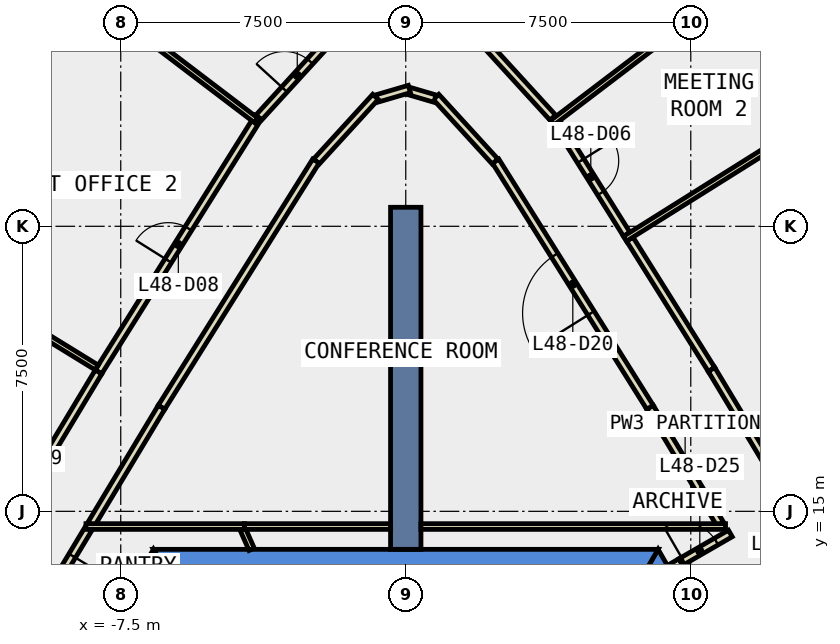
"""IFC4 building model, lengths in metres.
Left out: names, types, materials, properties, quantities, classifications, styles, units other than length and angle.
Written with IfcOpenShell. Run it as: python <this file> out.ifc"""

import sys

from ifc_helpers import new_model, si_unit, direction, frame, frame_2d, origin, place, context, subcontext, project, spatial, polyline, rectangle, outline, extrude, element, fill, save


model = new_model("IFC4")
c1 = context("Model", 3, precision=1e-05, world=origin(), true_north=direction((0.0, 1.0)))
c2 = subcontext(c1, "Body", "Model", "MODEL_VIEW")
j1 = project(units=[si_unit("LENGTHUNIT", "METRE"), si_unit("PLANEANGLEUNIT", "RADIAN")], contexts=[c1])
p1 = place(None, origin())
s1 = spatial("IfcSite", under=j1, at=p1, CompositionType="ELEMENT")
p2 = place(p1, origin())
s2 = spatial("IfcBuilding", under=s1, at=p2, CompositionType="ELEMENT")
p3 = place(p2, frame((0.0, 0.0, 215.0)))
s3 = spatial("IfcBuildingStorey", under=s2, at=p3, CompositionType="ELEMENT", Elevation=215.0)
p4 = place(p3, frame((0.0, 0.0, -0.4)))
e1 = element("IfcWall", 1, at=p4, inside=s3, PredefinedType="SHEAR", context=c2, shape_type="SweptSolid", body=[
    extrude(outline(polyline([(6.478, 12.88), (7.084, 13.23), (6.64, 14.0), (6.235, 13.3), (6.478, 12.88)])), origin(), (0.0, 0.0, 1.0), 4.2),
])
p5 = place(p3, frame((0.0, 0.0, -0.4)))
e2 = element("IfcWall", 2, at=p5, inside=s3, PredefinedType="SHEAR", context=c2, shape_type="SweptSolid", body=[
    extrude(outline(polyline([(6.64, 14.0), (-6.64, 14.0), (-6.235, 13.3), (6.235, 13.3), (6.64, 14.0)])), origin(), (0.0, 0.0, 1.0), 4.2),
])
p6 = place(p3, frame((0.0, 0.0, -0.4)))
e3 = element("IfcWall", 3, at=p6, inside=s3, PredefinedType="SHEAR", context=c2, shape_type="SweptSolid", body=[
    extrude(outline(polyline([(-11.834, 5.002), (-11.228, 4.652), (-6.235, 13.3), (-6.64, 14.0), (-11.834, 5.002)])), origin(), (0.0, 0.0, 1.0), 4.2),
])
p7 = place(p3, frame((0.0, 14.0, -0.4), z_axis=(0.0, 0.0, 1.0), x_axis=(0.0, 1.0, 0.0)))
e4 = element("IfcWall", 4, at=p7, inside=s3, PredefinedType="SHEAR", context=c2, shape_type="SweptSolid", body=[
    extrude(rectangle(XDim=9.0, YDim=0.8, at=frame_2d((4.5, 0.0))), origin(), (0.0, 0.0, 1.0), 4.2),
])
p8 = place(p3, frame((13.021, 22.374, 0.0), z_axis=(0.0, 0.0, 1.0), x_axis=(-0.531239262679, 0.847221839773, 0.0)))
e5 = element("IfcWall", 5, at=p8, inside=s3, PredefinedType="STANDARD", context=c2, shape_type="SweptSolid", body=[
    extrude(rectangle(XDim=7.339, YDim=0.3, at=frame_2d((3.67, 0.0))), origin(), (0.0, 0.0, 1.0), 3.8),
])
p9 = place(p8, frame((0.635, 0.0, 0.9)))
e6 = element("IfcOpeningElement", 6, at=p9, cuts=e5, PredefinedType="OPENING", context=c2, shape_type="SweptSolid", body=[
    extrude(rectangle(XDim=2.4, YDim=2.6, at=frame_2d((1.2, 1.3))), frame((0.0, 0.16, 0.0), z_axis=(0.0, -1.0, 0.0), x_axis=(1.0, 0.0, 0.0)), (0.0, 0.0, 1.0), 0.32),
])
p10 = place(p8, frame((4.304, 0.0, 0.9)))
e7 = element("IfcOpeningElement", 7, at=p10, cuts=e5, PredefinedType="OPENING", context=c2, shape_type="SweptSolid", body=[
    extrude(rectangle(XDim=2.4, YDim=2.6, at=frame_2d((1.2, 1.3))), frame((0.0, 0.16, 0.0), z_axis=(0.0, -1.0, 0.0), x_axis=(1.0, 0.0, 0.0)), (0.0, 0.0, 1.0), 0.32),
])
p11 = place(p3, frame((-9.122, 28.592, 0.0), z_axis=(0.0, 0.0, 1.0), x_axis=(-0.531239262679, -0.847221839773, 0.0)))
e8 = element("IfcWall", 8, at=p11, inside=s3, PredefinedType="STANDARD", context=c2, shape_type="SweptSolid", body=[
    extrude(rectangle(XDim=7.339, YDim=0.3, at=frame_2d((3.67, 0.0))), origin(), (0.0, 0.0, 1.0), 3.8),
])
p12 = place(p11, frame((0.635, 0.0, 0.9)))
e9 = element("IfcOpeningElement", 9, at=p12, cuts=e8, PredefinedType="OPENING", context=c2, shape_type="SweptSolid", body=[
    extrude(rectangle(XDim=2.4, YDim=2.6, at=frame_2d((1.2, 1.3))), frame((0.0, 0.16, 0.0), z_axis=(0.0, -1.0, 0.0), x_axis=(1.0, 0.0, 0.0)), (0.0, 0.0, 1.0), 0.32),
])
p13 = place(p11, frame((4.304, 0.0, 0.9)))
e10 = element("IfcOpeningElement", 10, at=p13, cuts=e8, PredefinedType="OPENING", context=c2, shape_type="SweptSolid", body=[
    extrude(rectangle(XDim=2.4, YDim=2.6, at=frame_2d((1.2, 1.3))), frame((0.0, 0.16, 0.0), z_axis=(0.0, -1.0, 0.0), x_axis=(1.0, 0.0, 0.0)), (0.0, 0.0, 1.0), 0.32),
])
p14 = place(p3, frame((6.934, 13.49, 0.0), z_axis=(0.0, 0.0, 1.0), x_axis=(0.865871789474, 0.500265973451, 0.0)))
e11 = element("IfcWall", 11, at=p14, inside=s3, PredefinedType="PARTITIONING", context=c2, shape_type="SweptSolid", body=[
    extrude(rectangle(XDim=0.35, YDim=0.2, at=frame_2d((0.175, 0.0))), origin(), (0.0, 0.0, 1.0), 2.4),
])
p15 = place(p3, frame((-8.353, 14.536, 0.0), z_axis=(0.0, 0.0, 1.0), x_axis=(-0.515636196259, -0.856807628997, 0.0)))
e12 = element("IfcWall", 12, at=p15, inside=s3, PredefinedType="PARTITIONING", context=c2, shape_type="SweptSolid", body=[
    extrude(rectangle(XDim=2.643, YDim=0.2, at=frame_2d((1.322, 0.0))), origin(), (0.0, 0.0, 1.0), 3.8),
])
p16 = place(p15, frame((0.822, 0.0, 0.0)))
e13 = element("IfcOpeningElement", 13, at=p16, cuts=e12, PredefinedType="OPENING", context=c2, shape_type="SweptSolid", body=[
    extrude(rectangle(XDim=1.0, YDim=2.1, at=frame_2d((0.5, 1.05))), frame((0.0, 0.11, 0.0), z_axis=(0.0, -1.0, 0.0), x_axis=(1.0, 0.0, 0.0)), (0.0, 0.0, 1.0), 0.22),
])
p17 = place(p3, frame((8.276, 14.664, 0.0), z_axis=(0.0, 0.0, 1.0), x_axis=(-0.515416266777, 0.85693994652, 0.0)))
e14 = element("IfcWall", 14, at=p17, inside=s3, PredefinedType="PARTITIONING", context=c2, shape_type="SweptSolid", body=[
    extrude(rectangle(XDim=3.587, YDim=0.2, at=frame_2d((1.793, 0.0))), origin(), (0.0, 0.0, 1.0), 3.8),
])
p18 = place(p3, frame((6.427, 17.738, 0.0), z_axis=(0.0, 0.0, 1.0), x_axis=(-0.531335643981, 0.847161397512, 0.0)))
e15 = element("IfcWall", 15, at=p18, inside=s3, PredefinedType="PARTITIONING", context=c2, shape_type="SweptSolid", body=[
    extrude(rectangle(XDim=7.647, YDim=0.2, at=frame_2d((3.823, 0.0))), origin(), (0.0, 0.0, 1.0), 3.8),
])
p19 = place(p18, frame((2.923, 0.0, 0.0)))
e16 = element("IfcOpeningElement", 16, at=p19, cuts=e15, PredefinedType="OPENING", context=c2, shape_type="SweptSolid", body=[
    extrude(rectangle(XDim=1.8, YDim=2.1, at=frame_2d((0.9, 1.05))), frame((0.0, 0.11, 0.0), z_axis=(0.0, -1.0, 0.0), x_axis=(1.0, 0.0, 0.0)), (0.0, 0.0, 1.0), 0.22),
])
p20 = place(p3, frame((2.35, 24.205, 0.0), z_axis=(0.0, 0.0, 1.0), x_axis=(-0.67475930229, 0.738037860799, 0.0)))
e17 = element("IfcWall", 17, at=p20, inside=s3, PredefinedType="PARTITIONING", context=c2, shape_type="SweptSolid", body=[
    extrude(rectangle(XDim=2.303, YDim=0.2, at=frame_2d((1.152, 0.0))), origin(), (0.0, 0.0, 1.0), 3.8),
])
p21 = place(p3, frame((0.768, 25.86, 0.0), z_axis=(0.0, 0.0, 1.0), x_axis=(-0.959714481723, 0.280977069476, 0.0)))
e18 = element("IfcWall", 18, at=p21, inside=s3, PredefinedType="PARTITIONING", context=c2, shape_type="SweptSolid", body=[
    extrude(rectangle(XDim=0.7, YDim=0.2, at=frame_2d((0.35, 0.0))), origin(), (0.0, 0.0, 1.0), 3.8),
])
p22 = place(p3, frame((0.096, 26.113, 0.0), z_axis=(0.0, 0.0, 1.0), x_axis=(-0.959723140705, -0.280947491882, 0.0)))
e19 = element("IfcWall", 19, at=p22, inside=s3, PredefinedType="PARTITIONING", context=c2, shape_type="SweptSolid", body=[
    extrude(rectangle(XDim=0.9, YDim=0.2, at=frame_2d((0.45, 0.0))), origin(), (0.0, 0.0, 1.0), 3.8),
])
p23 = place(p3, frame((-0.796, 25.905, 0.0), z_axis=(0.0, 0.0, 1.0), x_axis=(-0.67475930229, -0.738037860799, 0.0)))
e20 = element("IfcWall", 20, at=p23, inside=s3, PredefinedType="PARTITIONING", context=c2, shape_type="SweptSolid", body=[
    extrude(rectangle(XDim=2.303, YDim=0.2, at=frame_2d((1.152, 0.0))), origin(), (0.0, 0.0, 1.0), 3.8),
])
p24 = place(p3, frame((-2.364, 24.216, 0.0), z_axis=(0.0, 0.0, 1.0), x_axis=(-0.531335643981, -0.847161397512, 0.0)))
e21 = element("IfcWall", 21, at=p24, inside=s3, PredefinedType="PARTITIONING", context=c2, shape_type="SweptSolid", body=[
    extrude(rectangle(XDim=7.647, YDim=0.2, at=frame_2d((3.823, 0.0))), origin(), (0.0, 0.0, 1.0), 3.8),
])
p25 = place(p3, frame((-6.427, 17.738, 0.0), z_axis=(0.0, 0.0, 1.0), x_axis=(-0.515416266777, -0.85693994652, 0.0)))
e22 = element("IfcWall", 22, at=p25, inside=s3, PredefinedType="PARTITIONING", context=c2, shape_type="SweptSolid", body=[
    extrude(rectangle(XDim=3.587, YDim=0.2, at=frame_2d((1.793, 0.0))), origin(), (0.0, 0.0, 1.0), 3.8),
])
p26 = place(p3, frame((5.895, 22.162, 0.0), z_axis=(0.0, 0.0, 1.0), x_axis=(0.531245023709, -0.847218227368, 0.0)))
e23 = element("IfcWall", 23, at=p26, inside=s3, PredefinedType="PARTITIONING", context=c2, shape_type="SweptSolid", body=[
    extrude(rectangle(XDim=4.049, YDim=0.2, at=frame_2d((2.024, 0.0))), origin(), (0.0, 0.0, 1.0), 3.8),
])
p27 = place(p3, frame((8.046, 18.732, 0.0), z_axis=(0.0, 0.0, 1.0), x_axis=(0.515502328211, -0.856888178007, 0.0)))
e24 = element("IfcWall", 24, at=p27, inside=s3, PredefinedType="PARTITIONING", context=c2, shape_type="SweptSolid", body=[
    extrude(rectangle(XDim=8.058, YDim=0.2, at=frame_2d((4.029, 0.0))), origin(), (0.0, 0.0, 1.0), 3.8),
])
p28 = place(p27, frame((3.604, 0.0, 0.0)))
e25 = element("IfcOpeningElement", 25, at=p28, cuts=e24, PredefinedType="OPENING", context=c2, shape_type="SweptSolid", body=[
    extrude(rectangle(XDim=1.0, YDim=2.1, at=frame_2d((0.5, 1.05))), frame((0.0, 0.11, 0.0), z_axis=(0.0, -1.0, 0.0), x_axis=(1.0, 0.0, 0.0)), (0.0, 0.0, 1.0), 0.22),
])
p29 = place(p3, frame((3.923, 25.307, 0.0), z_axis=(0.0, 0.0, 1.0), x_axis=(0.531150612982, -0.847277419934, 0.0)))
e26 = element("IfcWall", 26, at=p29, inside=s3, PredefinedType="PARTITIONING", context=c2, shape_type="SweptSolid", body=[
    extrude(rectangle(XDim=3.562, YDim=0.2, at=frame_2d((1.781, 0.0))), origin(), (0.0, 0.0, 1.0), 3.8),
])
p30 = place(p29, frame((1.281, 0.0, 0.0)))
e27 = element("IfcOpeningElement", 27, at=p30, cuts=e26, PredefinedType="OPENING", context=c2, shape_type="SweptSolid", body=[
    extrude(rectangle(XDim=1.0, YDim=2.1, at=frame_2d((0.5, 1.05))), frame((0.0, 0.11, 0.0), z_axis=(0.0, -1.0, 0.0), x_axis=(1.0, 0.0, 0.0)), (0.0, 0.0, 1.0), 0.22),
])
p31 = place(p3, frame((-3.869, 25.36, 0.0), z_axis=(0.0, 0.0, 1.0), x_axis=(0.674594755709, 0.738188265668, 0.0)))
e28 = element("IfcWall", 28, at=p31, inside=s3, PredefinedType="PARTITIONING", context=c2, shape_type="SweptSolid", body=[
    extrude(rectangle(XDim=3.006, YDim=0.2, at=frame_2d((1.503, 0.0))), origin(), (0.0, 0.0, 1.0), 3.8),
])
p32 = place(p31, frame((1.003, 0.0, 0.0)))
e29 = element("IfcOpeningElement", 29, at=p32, cuts=e28, PredefinedType="OPENING", context=c2, shape_type="SweptSolid", body=[
    extrude(rectangle(XDim=1.0, YDim=2.1, at=frame_2d((0.5, 1.05))), frame((0.0, 0.11, 0.0), z_axis=(0.0, -1.0, 0.0), x_axis=(1.0, 0.0, 0.0)), (0.0, 0.0, 1.0), 0.22),
])
p33 = place(p3, frame((1.841, 27.579, 0.0), z_axis=(0.0, 0.0, 1.0), x_axis=(0.674594755709, -0.738188265668, 0.0)))
e30 = element("IfcWall", 30, at=p33, inside=s3, PredefinedType="PARTITIONING", context=c2, shape_type="SweptSolid", body=[
    extrude(rectangle(XDim=3.006, YDim=0.2, at=frame_2d((1.503, 0.0))), origin(), (0.0, 0.0, 1.0), 3.8),
])
p34 = place(p3, frame((-8.086, 18.669, 0.0), z_axis=(0.0, 0.0, 1.0), x_axis=(0.531329962263, 0.847164961033, 0.0)))
e31 = element("IfcWall", 31, at=p34, inside=s3, PredefinedType="PARTITIONING", context=c2, shape_type="SweptSolid", body=[
    extrude(rectangle(XDim=7.91, YDim=0.2, at=frame_2d((3.955, 0.0))), origin(), (0.0, 0.0, 1.0), 3.8),
])
p35 = place(p34, frame((3.455, 0.0, 0.0)))
e32 = element("IfcOpeningElement", 32, at=p35, cuts=e31, PredefinedType="OPENING", context=c2, shape_type="SweptSolid", body=[
    extrude(rectangle(XDim=1.0, YDim=2.1, at=frame_2d((0.5, 1.05))), frame((0.0, 0.11, 0.0), z_axis=(0.0, -1.0, 0.0), x_axis=(1.0, 0.0, 0.0)), (0.0, 0.0, 1.0), 0.22),
])
p36 = place(p3, frame((-12.239, 11.763, 0.0), z_axis=(0.0, 0.0, 1.0), x_axis=(0.515591302858, 0.856834644734, 0.0)))
e33 = element("IfcWall", 33, at=p36, inside=s3, PredefinedType="PARTITIONING", context=c2, shape_type="SweptSolid", body=[
    extrude(rectangle(XDim=8.059, YDim=0.2, at=frame_2d((4.029, 0.0))), origin(), (0.0, 0.0, 1.0), 3.8),
])
p37 = place(p36, frame((3.604, 0.0, 0.0)))
e34 = element("IfcOpeningElement", 34, at=p37, cuts=e33, PredefinedType="OPENING", context=c2, shape_type="SweptSolid", body=[
    extrude(rectangle(XDim=1.0, YDim=2.1, at=frame_2d((0.5, 1.05))), frame((0.0, 0.11, 0.0), z_axis=(0.0, -1.0, 0.0), x_axis=(1.0, 0.0, 0.0)), (0.0, 0.0, 1.0), 0.22),
])
p38 = place(p3, frame((-4.055, 14.0, 0.0), z_axis=(0.0, 0.0, 1.0), x_axis=(-0.404850841056, 0.914382740703, 0.0)))
e35 = element("IfcWall", 35, at=p38, inside=s3, PredefinedType="PARTITIONING", context=c2, shape_type="SweptSolid", body=[
    extrude(rectangle(XDim=0.581, YDim=0.15, at=frame_2d((0.291, 0.0))), origin(), (0.0, 0.0, 1.0), 3.8),
])
p39 = place(p3, frame((8.415, 14.6, 0.0), z_axis=(0.0, 0.0, 1.0), x_axis=(-1.0, 0.0, 0.0)))
e36 = element("IfcWall", 36, at=p39, inside=s3, PredefinedType="PARTITIONING", context=c2, shape_type="SweptSolid", body=[
    extrude(rectangle(XDim=8.015, YDim=0.15, at=frame_2d((4.008, 0.0))), origin(), (0.0, 0.0, 1.0), 3.8),
])
p40 = place(p3, frame((-4.245, 14.6, 0.0), z_axis=(0.0, 0.0, 1.0), x_axis=(-1.0, 0.0, 0.0)))
e37 = element("IfcWall", 37, at=p40, inside=s3, PredefinedType="PARTITIONING", context=c2, shape_type="SweptSolid", body=[
    extrude(rectangle(XDim=4.17, YDim=0.15, at=frame_2d((2.085, 0.0))), origin(), (0.0, 0.0, 1.0), 3.8),
])
p41 = place(p3, frame((5.77, 22.172, 0.0), z_axis=(0.0, 0.0, 1.0), x_axis=(0.847187879248, 0.531293419171, 0.0)))
e38 = element("IfcWall", 38, at=p41, inside=s3, PredefinedType="PARTITIONING", context=c2, shape_type="SweptSolid", body=[
    extrude(rectangle(XDim=6.1, YDim=0.15, at=frame_2d((3.05, 0.0))), origin(), (0.0, 0.0, 1.0), 3.8),
])
p42 = place(p3, frame((3.856, 25.225, 0.0), z_axis=(0.0, 0.0, 1.0), x_axis=(0.795987848728, 0.605312600792, 0.0)))
e39 = element("IfcWall", 39, at=p42, inside=s3, PredefinedType="PARTITIONING", context=c2, shape_type="SweptSolid", body=[
    extrude(rectangle(XDim=4.804, YDim=0.15, at=frame_2d((2.402, 0.0))), origin(), (0.0, 0.0, 1.0), 3.8),
])
p43 = place(p3, frame((-3.936, 25.286, 0.0), z_axis=(0.0, 0.0, 1.0), x_axis=(-0.795977117067, 0.605326712698, 0.0)))
e40 = element("IfcWall", 40, at=p43, inside=s3, PredefinedType="PARTITIONING", context=c2, shape_type="SweptSolid", body=[
    extrude(rectangle(XDim=4.704, YDim=0.15, at=frame_2d((2.352, 0.0))), origin(), (0.0, 0.0, 1.0), 3.8),
])
p44 = place(p3, frame((-8.131, 18.784, 0.0), z_axis=(0.0, 0.0, 1.0), x_axis=(-0.851969320918, 0.52359170755, 0.0)))
e41 = element("IfcWall", 41, at=p44, inside=s3, PredefinedType="PARTITIONING", context=c2, shape_type="SweptSolid", body=[
    extrude(rectangle(XDim=4.58, YDim=0.15, at=frame_2d((2.29, 0.0))), origin(), (0.0, 0.0, 1.0), 3.8),
])
p45 = place(p3, frame((-0.4, 14.6, 0.0), z_axis=(0.0, 0.0, 1.0), x_axis=(-1.0, 0.0, 0.0)))
e42 = element("IfcWall", 42, at=p45, inside=s3, PredefinedType="PARTITIONING", context=c2, shape_type="SweptSolid", body=[
    extrude(rectangle(XDim=3.845, YDim=0.15, at=frame_2d((1.923, 0.0))), origin(), (0.0, 0.0, 1.0), 3.8),
])
p46 = place(p3, frame((7.237, 13.665, 0.0), z_axis=(0.0, 0.0, 1.0), x_axis=(0.865999269783, 0.500045262687, 0.0)))
e43 = element("IfcWall", 43, at=p46, inside=s3, PredefinedType="PARTITIONING", context=c2, shape_type="SweptSolid", body=[
    extrude(rectangle(XDim=1.506, YDim=0.2, at=frame_2d((0.753, 0.0))), origin(), (0.0, 0.0, 1.0), 3.8),
])
p47 = place(p46, frame((0.078, 0.0, 0.0)))
e44 = element("IfcOpeningElement", 44, at=p47, cuts=e43, PredefinedType="OPENING", context=c2, shape_type="SweptSolid", body=[
    extrude(rectangle(XDim=1.0, YDim=2.1, at=frame_2d((0.5, 1.05))), frame((0.0, 0.11, 0.0), z_axis=(0.0, -1.0, 0.0), x_axis=(1.0, 0.0, 0.0)), (0.0, 0.0, 1.0), 0.22),
])
p48 = place(p30, origin())
e45 = element("IfcDoor", 45, at=p48, inside=s3, OperationType="SINGLE_SWING_LEFT", PredefinedType="DOOR", context=c2, shape_type="SweptSolid", body=[
    extrude(rectangle(XDim=1.0, YDim=2.1, at=frame_2d((0.5, 1.05))), frame((0.0, 0.025, 0.0), z_axis=(0.0, -1.0, 0.0), x_axis=(1.0, 0.0, 0.0)), (0.0, 0.0, 1.0), 0.05),
])
fill(e27, e45)
p49 = place(p32, origin())
e46 = element("IfcDoor", 46, at=p49, inside=s3, OperationType="SINGLE_SWING_LEFT", PredefinedType="DOOR", context=c2, shape_type="SweptSolid", body=[
    extrude(rectangle(XDim=1.0, YDim=2.1, at=frame_2d((0.5, 1.05))), frame((0.0, 0.025, 0.0), z_axis=(0.0, -1.0, 0.0), x_axis=(1.0, 0.0, 0.0)), (0.0, 0.0, 1.0), 0.05),
])
fill(e29, e46)
p50 = place(p35, origin())
e47 = element("IfcDoor", 47, at=p50, inside=s3, OperationType="SINGLE_SWING_RIGHT", PredefinedType="DOOR", context=c2, shape_type="SweptSolid", body=[
    extrude(rectangle(XDim=1.0, YDim=2.1, at=frame_2d((0.5, 1.05))), frame((0.0, 0.025, 0.0), z_axis=(0.0, -1.0, 0.0), x_axis=(1.0, 0.0, 0.0)), (0.0, 0.0, 1.0), 0.05),
])
fill(e32, e47)
p51 = place(p19, origin())
e48 = element("IfcDoor", 48, at=p51, inside=s3, OperationType="DOUBLE_DOOR_SINGLE_SWING", PredefinedType="DOOR", context=c2, shape_type="SweptSolid", body=[
    extrude(rectangle(XDim=1.8, YDim=2.1, at=frame_2d((0.9, 1.05))), frame((0.0, 0.025, 0.0), z_axis=(0.0, -1.0, 0.0), x_axis=(1.0, 0.0, 0.0)), (0.0, 0.0, 1.0), 0.05),
])
fill(e16, e48)
p52 = place(p47, origin())
e49 = element("IfcDoor", 49, at=p52, inside=s3, OperationType="SINGLE_SWING_LEFT", PredefinedType="DOOR", context=c2, shape_type="SweptSolid", body=[
    extrude(rectangle(XDim=1.0, YDim=2.1, at=frame_2d((0.5, 1.05))), frame((0.0, 0.025, 0.0), z_axis=(0.0, -1.0, 0.0), x_axis=(1.0, 0.0, 0.0)), (0.0, 0.0, 1.0), 0.05),
])
fill(e44, e49)
p53 = place(p16, origin())
e50 = element("IfcDoor", 50, at=p53, inside=s3, OperationType="SINGLE_SWING_LEFT", PredefinedType="DOOR", context=c2, shape_type="SweptSolid", body=[
    extrude(rectangle(XDim=1.0, YDim=2.1, at=frame_2d((0.5, 1.05))), frame((0.0, 0.025, 0.0), z_axis=(0.0, -1.0, 0.0), x_axis=(1.0, 0.0, 0.0)), (0.0, 0.0, 1.0), 0.05),
])
fill(e13, e50)
save(model, sys.argv[1])
